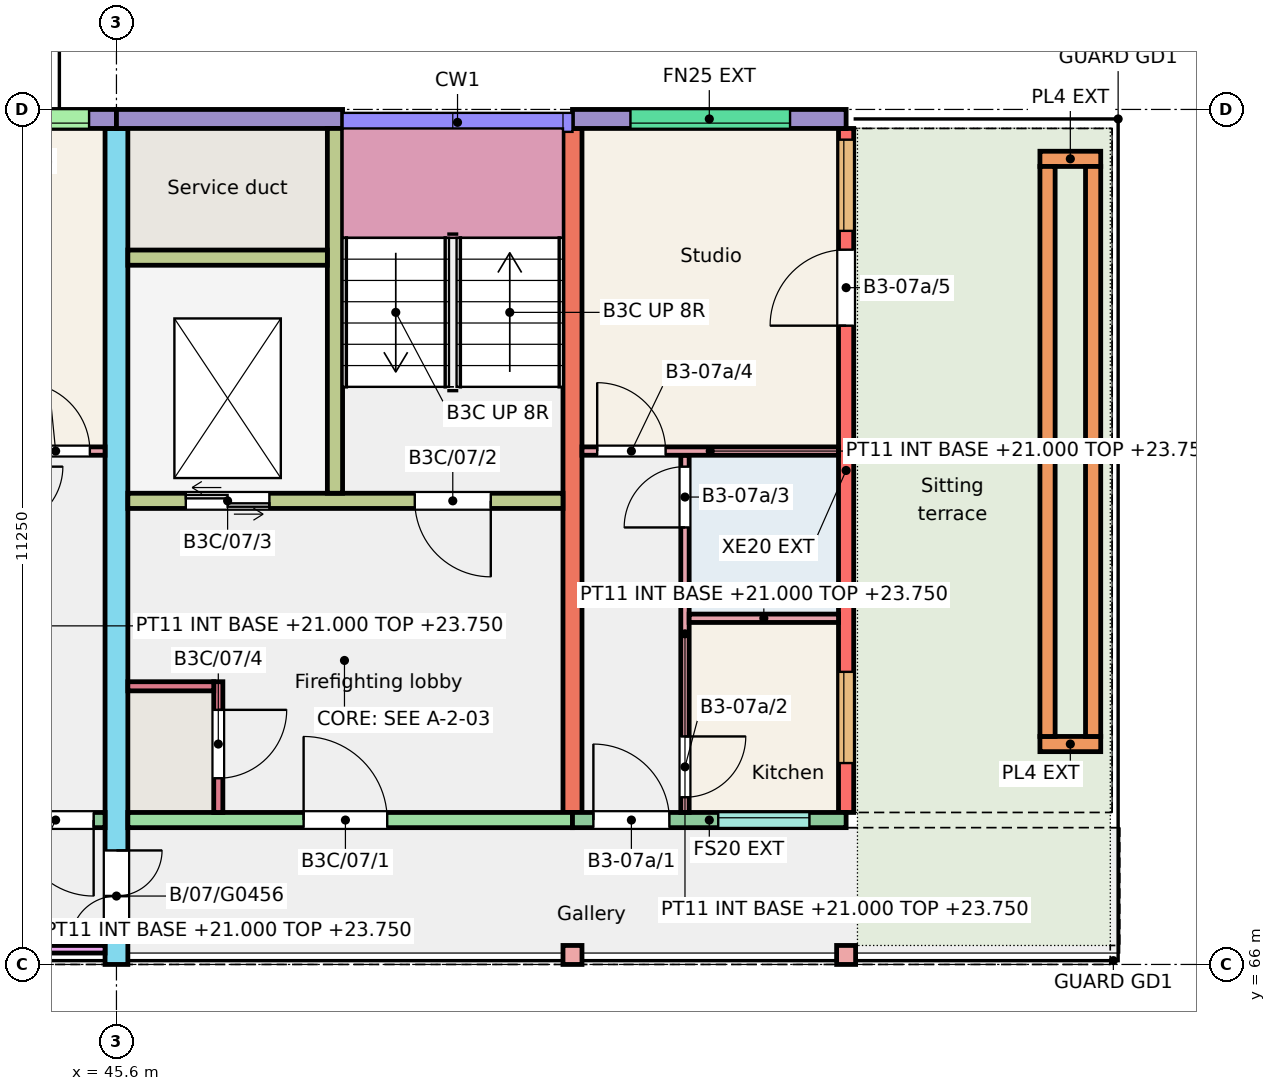
"""IFC4 building model, lengths in metres.
Left out: names, types, materials, properties, quantities, classifications, styles, units other than length and angle.
Written with IfcOpenShell. Run it as: python <this file> out.ifc"""

import sys

from ifc_helpers import new_model, si_unit, direction, frame, frame_2d, origin, origin_2d, place, context, subcontext, project, spatial, rectangle, extrude, element, fill, save


model = new_model("IFC4")
c1 = context("Model", 3, precision=1e-05, world=origin(), true_north=direction((0.0, 1.0)))
c2 = subcontext(c1, "Body", "Model", "MODEL_VIEW")
j1 = project(units=[si_unit("LENGTHUNIT", "METRE"), si_unit("PLANEANGLEUNIT", "RADIAN")], contexts=[c1])
p1 = place(None, origin())
s1 = spatial("IfcSite", under=j1, at=p1, CompositionType="ELEMENT")
p2 = place(p1, origin())
s2 = spatial("IfcBuilding", under=s1, at=p2, CompositionType="ELEMENT")
p3 = place(p2, frame((0.0, 0.0, 21.0)))
s3 = spatial("IfcBuildingStorey", under=s2, at=p3, CompositionType="ELEMENT", Elevation=21.0)
p4 = place(p3, frame((45.6, 66.0, 0.0), z_axis=(0.0, 0.0, 1.0), x_axis=(0.0, 1.0, 0.0)))
e1 = element("IfcWall", 1, at=p4, inside=s3, PredefinedType="SHEAR", context=c2, shape_type="SweptSolid", body=[
    extrude(rectangle(XDim=11.0, YDim=0.3, at=frame_2d((5.5, 0.0))), origin(), (0.0, 0.0, 1.0), 3.0),
])
p5 = place(p4, frame((0.3, 0.0, 0.0)))
e2 = element("IfcOpeningElement", 2, at=p5, cuts=e1, PredefinedType="OPENING", context=c2, shape_type="SweptSolid", body=[
    extrude(rectangle(XDim=1.2, YDim=2.1, at=frame_2d((0.6, 1.05))), frame((0.0, 0.16, 0.0), z_axis=(0.0, -1.0, 0.0), x_axis=(1.0, 0.0, 0.0)), (0.0, 0.0, 1.0), 0.32),
])
p6 = place(p3, frame((51.6, 68.0, 0.0), z_axis=(0.0, 0.0, 1.0), x_axis=(0.0, 1.0, 0.0)))
e3 = element("IfcWall", 3, at=p6, inside=s3, PredefinedType="SHEAR", context=c2, shape_type="SweptSolid", body=[
    extrude(rectangle(XDim=9.0, YDim=0.25, at=frame_2d((4.5, 0.0))), origin(), (0.0, 0.0, 1.0), 3.0),
])
p7 = place(p3, frame((55.2, 68.0, 0.0), z_axis=(0.0, 0.0, 1.0), x_axis=(0.0, 1.0, 0.0)))
e4 = element("IfcWall", 4, at=p7, inside=s3, PredefinedType="SHEAR", context=c2, shape_type="SweptSolid", body=[
    extrude(rectangle(XDim=9.0, YDim=0.2, at=frame_2d((4.5, 0.0))), origin(), (0.0, 0.0, 1.0), 3.0),
])
p8 = place(p7, frame((0.65, 0.0, 0.9)))
e5 = element("IfcOpeningElement", 5, at=p8, cuts=e4, PredefinedType="OPENING", context=c2, shape_type="SweptSolid", body=[
    extrude(rectangle(XDim=1.2, YDim=1.5, at=frame_2d((0.6, 0.75))), frame((0.0, 0.11, 0.0), z_axis=(0.0, -1.0, 0.0), x_axis=(1.0, 0.0, 0.0)), (0.0, 0.0, 1.0), 0.22),
])
p9 = place(p7, frame((7.653, 0.0, 0.9)))
e6 = element("IfcOpeningElement", 6, at=p9, cuts=e4, PredefinedType="OPENING", context=c2, shape_type="SweptSolid", body=[
    extrude(rectangle(XDim=1.2, YDim=1.5, at=frame_2d((0.6, 0.75))), frame((0.0, 0.11, 0.0), z_axis=(0.0, -1.0, 0.0), x_axis=(1.0, 0.0, 0.0)), (0.0, 0.0, 1.0), 0.22),
])
p10 = place(p7, frame((6.405, 0.0, 0.0)))
e7 = element("IfcOpeningElement", 7, at=p10, cuts=e4, PredefinedType="OPENING", context=c2, shape_type="SweptSolid", body=[
    extrude(rectangle(XDim=1.0, YDim=2.1, at=frame_2d((0.5, 1.05))), frame((0.0, 0.11, 0.0), z_axis=(0.0, -1.0, 0.0), x_axis=(1.0, 0.0, 0.0)), (0.0, 0.0, 1.0), 0.22),
])
p11 = place(p3, frame((42.0, 77.125, 0.0), z_axis=(0.0, 0.0, 1.0), x_axis=(1.0, 0.0, 0.0)))
e8 = element("IfcWall", 8, at=p11, inside=s3, PredefinedType="SOLIDWALL", context=c2, shape_type="SweptSolid", body=[
    extrude(rectangle(XDim=3.6, YDim=0.25, at=frame_2d((1.8, 0.0))), origin(), (0.0, 0.0, 1.0), 3.0),
])
p12 = place(p11, frame((1.74, 0.0, 1.2)))
e9 = element("IfcOpeningElement", 9, at=p12, cuts=e8, PredefinedType="OPENING", context=c2, shape_type="SweptSolid", body=[
    extrude(rectangle(XDim=1.5, YDim=1.2, at=frame_2d((0.75, 0.6))), frame((0.0, 0.135, 0.0), z_axis=(0.0, -1.0, 0.0), x_axis=(1.0, 0.0, 0.0)), (0.0, 0.0, 1.0), 0.27),
])
p13 = place(p11, frame((0.43, 0.0, 0.0)))
e10 = element("IfcOpeningElement", 10, at=p13, cuts=e8, PredefinedType="OPENING", context=c2, shape_type="SweptSolid", body=[
    extrude(rectangle(XDim=1.0, YDim=2.1, at=frame_2d((0.5, 1.05))), frame((0.0, 0.135, 0.0), z_axis=(0.0, -1.0, 0.0), x_axis=(1.0, 0.0, 0.0)), (0.0, 0.0, 1.0), 0.27),
])
p14 = place(p3, frame((42.0, 67.9, 0.0), z_axis=(0.0, 0.0, 1.0), x_axis=(1.0, 0.0, 0.0)))
e11 = element("IfcWall", 11, at=p14, inside=s3, PredefinedType="SOLIDWALL", context=c2, shape_type="SweptSolid", body=[
    extrude(rectangle(XDim=3.45, YDim=0.2, at=frame_2d((1.725, 0.0))), origin(), (0.0, 0.0, 1.0), 3.0),
])
p15 = place(p14, frame((0.47, 0.0, 1.1)))
e12 = element("IfcOpeningElement", 12, at=p15, cuts=e11, PredefinedType="OPENING", context=c2, shape_type="SweptSolid", body=[
    extrude(rectangle(XDim=1.2, YDim=1.3, at=frame_2d((0.6, 0.65))), frame((0.0, 0.11, 0.0), z_axis=(0.0, -1.0, 0.0), x_axis=(1.0, 0.0, 0.0)), (0.0, 0.0, 1.0), 0.22),
])
p16 = place(p14, frame((2.3, 0.0, 0.0)))
e13 = element("IfcOpeningElement", 13, at=p16, cuts=e11, PredefinedType="OPENING", context=c2, shape_type="SweptSolid", body=[
    extrude(rectangle(XDim=1.0, YDim=2.1, at=frame_2d((0.5, 1.05))), frame((0.0, 0.11, 0.0), z_axis=(0.0, -1.0, 0.0), x_axis=(1.0, 0.0, 0.0)), (0.0, 0.0, 1.0), 0.22),
])
p17 = place(p3, frame((45.6, 77.125, 0.0), z_axis=(0.0, 0.0, 1.0), x_axis=(1.0, 0.0, 0.0)))
e14 = element("IfcWall", 14, at=p17, inside=s3, PredefinedType="SOLIDWALL", context=c2, shape_type="SweptSolid", body=[
    extrude(rectangle(XDim=2.975, YDim=0.25, at=frame_2d((1.487, 0.0))), origin(), (0.0, 0.0, 1.0), 3.0),
])
p18 = place(p3, frame((45.75, 67.9, 0.0), z_axis=(0.0, 0.0, 1.0), x_axis=(1.0, 0.0, 0.0)))
e15 = element("IfcWall", 15, at=p18, inside=s3, PredefinedType="SHEAR", context=c2, shape_type="SweptSolid", body=[
    extrude(rectangle(XDim=5.85, YDim=0.2, at=frame_2d((2.925, 0.0))), origin(), (0.0, 0.0, 1.0), 3.0),
])
p19 = place(p18, frame((2.312, 0.0, 0.0)))
e16 = element("IfcOpeningElement", 16, at=p19, cuts=e15, PredefinedType="OPENING", context=c2, shape_type="SweptSolid", body=[
    extrude(rectangle(XDim=1.1, YDim=2.1, at=frame_2d((0.55, 1.05))), frame((0.0, 0.11, 0.0), z_axis=(0.0, -1.0, 0.0), x_axis=(1.0, 0.0, 0.0)), (0.0, 0.0, 1.0), 0.22),
])
p20 = place(p3, frame((45.75, 72.1, 0.0), z_axis=(0.0, 0.0, 1.0), x_axis=(1.0, 0.0, 0.0)))
e17 = element("IfcWall", 17, at=p20, inside=s3, PredefinedType="SHEAR", context=c2, shape_type="SweptSolid", body=[
    extrude(rectangle(XDim=5.725, YDim=0.2, at=frame_2d((2.863, 0.0))), origin(), (0.0, 0.0, 1.0), 3.0),
])
p21 = place(p20, frame((3.775, 0.0, 0.0)))
e18 = element("IfcOpeningElement", 18, at=p21, cuts=e17, PredefinedType="OPENING", context=c2, shape_type="SweptSolid", body=[
    extrude(rectangle(XDim=1.0, YDim=2.1, at=frame_2d((0.5, 1.05))), frame((0.0, 0.11, 0.0), z_axis=(0.0, -1.0, 0.0), x_axis=(1.0, 0.0, 0.0)), (0.0, 0.0, 1.0), 0.22),
])
p22 = place(p20, frame((0.762, 0.0, 0.0)))
e19 = element("IfcOpeningElement", 19, at=p22, cuts=e17, PredefinedType="OPENING", context=c2, shape_type="SweptSolid", body=[
    extrude(rectangle(XDim=1.1, YDim=2.1, at=frame_2d((0.55, 1.05))), frame((0.0, 0.11, 0.0), z_axis=(0.0, -1.0, 0.0), x_axis=(1.0, 0.0, 0.0)), (0.0, 0.0, 1.0), 0.22),
])
p23 = place(p3, frame((48.475, 72.2, 0.0), z_axis=(0.0, 0.0, 1.0), x_axis=(0.0, 1.0, 0.0)))
e20 = element("IfcWall", 20, at=p23, inside=s3, PredefinedType="SHEAR", context=c2, shape_type="SweptSolid", body=[
    extrude(rectangle(XDim=4.8, YDim=0.2, at=frame_2d((2.4, 0.0))), origin(), (0.0, 0.0, 1.0), 3.0),
])
p24 = place(p3, frame((45.75, 75.3, 0.0), z_axis=(0.0, 0.0, 1.0), x_axis=(1.0, 0.0, 0.0)))
e21 = element("IfcWall", 21, at=p24, inside=s3, PredefinedType="SHEAR", context=c2, shape_type="SweptSolid", body=[
    extrude(rectangle(XDim=2.625, YDim=0.2, at=frame_2d((1.312, 0.0))), origin(), (0.0, 0.0, 1.0), 3.0),
])
p25 = place(p3, frame((46.94, 68.0, 0.0), z_axis=(0.0, 0.0, 1.0), x_axis=(0.0, 1.0, 0.0)))
e22 = element("IfcWall", 22, at=p25, inside=s3, PredefinedType="SHEAR", context=c2, shape_type="SweptSolid", body=[
    extrude(rectangle(XDim=1.72, YDim=0.12, at=frame_2d((0.86, 0.0))), origin(), (0.0, 0.0, 1.0), 3.0),
])
p26 = place(p25, frame((0.45, 0.0, 0.0)))
e23 = element("IfcOpeningElement", 23, at=p26, cuts=e22, PredefinedType="OPENING", context=c2, shape_type="SweptSolid", body=[
    extrude(rectangle(XDim=0.9, YDim=2.1, at=frame_2d((0.45, 1.05))), frame((0.0, 0.07, 0.0), z_axis=(0.0, -1.0, 0.0), x_axis=(1.0, 0.0, 0.0)), (0.0, 0.0, 1.0), 0.14),
])
p27 = place(p3, frame((45.75, 69.66, 0.0), z_axis=(0.0, 0.0, 1.0), x_axis=(1.0, 0.0, 0.0)))
e24 = element("IfcWall", 24, at=p27, inside=s3, PredefinedType="SHEAR", context=c2, shape_type="SweptSolid", body=[
    extrude(rectangle(XDim=1.13, YDim=0.12, at=frame_2d((0.565, 0.0))), origin(), (0.0, 0.0, 1.0), 3.0),
])
p28 = place(p3, frame((51.6, 77.125, 0.0), z_axis=(0.0, 0.0, 1.0), x_axis=(1.0, 0.0, 0.0)))
e25 = element("IfcWall", 25, at=p28, inside=s3, PredefinedType="SOLIDWALL", context=c2, shape_type="SweptSolid", body=[
    extrude(rectangle(XDim=3.6, YDim=0.25, at=frame_2d((1.8, 0.0))), origin(), (0.0, 0.0, 1.0), 3.0),
])
p29 = place(p28, frame((0.762, 0.0, 1.2)))
e26 = element("IfcOpeningElement", 26, at=p29, cuts=e25, PredefinedType="OPENING", context=c2, shape_type="SweptSolid", body=[
    extrude(rectangle(XDim=2.1, YDim=1.2, at=frame_2d((1.05, 0.6))), frame((0.0, 0.135, 0.0), z_axis=(0.0, -1.0, 0.0), x_axis=(1.0, 0.0, 0.0)), (0.0, 0.0, 1.0), 0.27),
])
p30 = place(p3, frame((51.6, 67.9, 0.0), z_axis=(0.0, 0.0, 1.0), x_axis=(1.0, 0.0, 0.0)))
e27 = element("IfcWall", 27, at=p30, inside=s3, PredefinedType="SOLIDWALL", context=c2, shape_type="SweptSolid", body=[
    extrude(rectangle(XDim=3.6, YDim=0.2, at=frame_2d((1.8, 0.0))), origin(), (0.0, 0.0, 1.0), 3.0),
])
p31 = place(p30, frame((1.917, 0.0, 1.1)))
e28 = element("IfcOpeningElement", 28, at=p31, cuts=e27, PredefinedType="OPENING", context=c2, shape_type="SweptSolid", body=[
    extrude(rectangle(XDim=1.2, YDim=1.3, at=frame_2d((0.6, 0.65))), frame((0.0, 0.11, 0.0), z_axis=(0.0, -1.0, 0.0), x_axis=(1.0, 0.0, 0.0)), (0.0, 0.0, 1.0), 0.22),
])
p32 = place(p30, frame((0.275, 0.0, 0.0)))
e29 = element("IfcOpeningElement", 29, at=p32, cuts=e27, PredefinedType="OPENING", context=c2, shape_type="SweptSolid", body=[
    extrude(rectangle(XDim=1.0, YDim=2.1, at=frame_2d((0.5, 1.05))), frame((0.0, 0.11, 0.0), z_axis=(0.0, -1.0, 0.0), x_axis=(1.0, 0.0, 0.0)), (0.0, 0.0, 1.0), 0.22),
])
for number, where, z_axis, x_axis in (
    (30, (51.6, 66.125, 0.0), (0.0, 0.0, 1.0), (1.0, 0.0, 0.0)),
    (31, (55.2, 66.125, 0.0), (0.0, 0.0, 1.0), (1.0, 0.0, 0.0)),
):
    element("IfcColumn", number, at=place(p3, frame(where, z_axis=z_axis, x_axis=x_axis)), inside=s3, PredefinedType="COLUMN", context=c2, shape_type="SweptSolid", body=[
        extrude(rectangle(XDim=0.25, YDim=0.25, at=origin_2d()), origin(), (0.0, 0.0, 1.0), 3.0),
    ])
for number, where, z_axis, x_axis in (
    (32, (57.75, 68.9, 0.01), (0.0, 0.0, 1.0), (1.0, 0.0, 0.0)),
    (33, (57.75, 76.6, 0.01), (0.0, 0.0, 1.0), (1.0, 0.0, 0.0)),
):
    element("IfcWall", number, at=place(p3, frame(where, z_axis=z_axis, x_axis=x_axis)), inside=s3, PredefinedType="SOLIDWALL", context=c2, shape_type="SweptSolid", body=[
        extrude(rectangle(XDim=0.8, YDim=0.2, at=frame_2d((0.4, 0.0))), origin(), (0.0, 0.0, 1.0), 0.45),
    ])
for number, where, z_axis, x_axis in (
    (34, (57.85, 69.0, 0.01), (0.0, 0.0, 1.0), (0.0, 1.0, 0.0)),
    (35, (58.45, 69.0, 0.01), (0.0, 0.0, 1.0), (0.0, 1.0, 0.0)),
):
    element("IfcWall", number, at=place(p3, frame(where, z_axis=z_axis, x_axis=x_axis)), inside=s3, PredefinedType="SOLIDWALL", context=c2, shape_type="SweptSolid", body=[
        extrude(rectangle(XDim=7.5, YDim=0.2, at=frame_2d((3.75, 0.0))), origin(), (0.0, 0.0, 1.0), 0.45),
    ])
p33 = place(p3, frame((42.125, 66.2, 0.0), z_axis=(0.0, 0.0, 1.0), x_axis=(1.0, 0.0, 0.0)))
e36 = element("IfcWall", 36, at=p33, inside=s3, PredefinedType="SOLIDWALL", context=c2, shape_type="SweptSolid", body=[
    extrude(rectangle(XDim=3.325, YDim=0.1, at=frame_2d((1.663, 0.0))), origin(), (0.0, 0.0, 1.0), 2.45),
])
p34 = place(p3, frame((42.1, 72.755, 0.0), z_axis=(0.0, 0.0, 1.0), x_axis=(1.0, 0.0, 0.0)))
e37 = element("IfcWall", 37, at=p34, inside=s3, PredefinedType="PARTITIONING", context=c2, shape_type="SweptSolid", body=[
    extrude(rectangle(XDim=3.35, YDim=0.11, at=frame_2d((1.675, 0.0))), origin(), (0.0, 0.0, 1.0), 2.75),
])
p35 = place(p34, frame((2.25, 0.0, 0.0)))
e38 = element("IfcOpeningElement", 38, at=p35, cuts=e37, PredefinedType="OPENING", context=c2, shape_type="SweptSolid", body=[
    extrude(rectangle(XDim=0.9, YDim=2.1, at=frame_2d((0.45, 1.05))), frame((0.0, 0.065, 0.0), z_axis=(0.0, -1.0, 0.0), x_axis=(1.0, 0.0, 0.0)), (0.0, 0.0, 1.0), 0.13),
])
p36 = place(p3, frame((53.08, 68.0, 0.0), z_axis=(0.0, 0.0, 1.0), x_axis=(0.0, 1.0, 0.0)))
e39 = element("IfcWall", 39, at=p36, inside=s3, PredefinedType="PARTITIONING", context=c2, shape_type="SweptSolid", body=[
    extrude(rectangle(XDim=4.7, YDim=0.11, at=frame_2d((2.35, 0.0))), origin(), (0.0, 0.0, 1.0), 2.75),
])
p37 = place(p36, frame((0.2, 0.0, 0.0)))
e40 = element("IfcOpeningElement", 40, at=p37, cuts=e39, PredefinedType="OPENING", context=c2, shape_type="SweptSolid", body=[
    extrude(rectangle(XDim=0.8, YDim=2.1, at=frame_2d((0.4, 1.05))), frame((0.0, 0.065, 0.0), z_axis=(0.0, -1.0, 0.0), x_axis=(1.0, 0.0, 0.0)), (0.0, 0.0, 1.0), 0.13),
])
p38 = place(p36, frame((3.75, 0.0, 0.0)))
e41 = element("IfcOpeningElement", 41, at=p38, cuts=e39, PredefinedType="OPENING", context=c2, shape_type="SweptSolid", body=[
    extrude(rectangle(XDim=0.8, YDim=2.1, at=frame_2d((0.4, 1.05))), frame((0.0, 0.065, 0.0), z_axis=(0.0, -1.0, 0.0), x_axis=(1.0, 0.0, 0.0)), (0.0, 0.0, 1.0), 0.13),
])
p39 = place(p3, frame((53.135, 70.555, 0.0), z_axis=(0.0, 0.0, 1.0), x_axis=(1.0, 0.0, 0.0)))
e42 = element("IfcWall", 42, at=p39, inside=s3, PredefinedType="PARTITIONING", context=c2, shape_type="SweptSolid", body=[
    extrude(rectangle(XDim=1.965, YDim=0.11, at=frame_2d((0.982, 0.0))), origin(), (0.0, 0.0, 1.0), 2.75),
])
p40 = place(p3, frame((51.725, 72.755, 0.0), z_axis=(0.0, 0.0, 1.0), x_axis=(1.0, 0.0, 0.0)))
e43 = element("IfcWall", 43, at=p40, inside=s3, PredefinedType="PARTITIONING", context=c2, shape_type="SweptSolid", body=[
    extrude(rectangle(XDim=3.375, YDim=0.11, at=frame_2d((1.688, 0.0))), origin(), (0.0, 0.0, 1.0), 2.75),
])
p41 = place(p40, frame((0.2, 0.0, 0.0)))
e44 = element("IfcOpeningElement", 44, at=p41, cuts=e43, PredefinedType="OPENING", context=c2, shape_type="SweptSolid", body=[
    extrude(rectangle(XDim=0.9, YDim=2.1, at=frame_2d((0.45, 1.05))), frame((0.0, 0.065, 0.0), z_axis=(0.0, -1.0, 0.0), x_axis=(1.0, 0.0, 0.0)), (0.0, 0.0, 1.0), 0.13),
])
p42 = place(p12, origin())
e45 = element("IfcWindow", 45, at=p42, inside=s3, PartitioningType="SINGLE_PANEL", PredefinedType="WINDOW", context=c2, shape_type="SweptSolid", body=[
    extrude(rectangle(XDim=1.5, YDim=1.2, at=frame_2d((0.75, 0.6))), frame((0.0, -0.025, 0.0), z_axis=(0.0, -1.0, 0.0), x_axis=(1.0, 0.0, 0.0)), (0.0, 0.0, 1.0), 0.06),
])
fill(e9, e45)
p43 = place(p31, origin())
e46 = element("IfcWindow", 46, at=p43, inside=s3, PartitioningType="SINGLE_PANEL", PredefinedType="WINDOW", context=c2, shape_type="SweptSolid", body=[
    extrude(rectangle(XDim=1.2, YDim=1.3, at=frame_2d((0.6, 0.65))), frame((0.0, 0.06, 0.0), z_axis=(0.0, -1.0, 0.0), x_axis=(1.0, 0.0, 0.0)), (0.0, 0.0, 1.0), 0.06),
])
fill(e28, e46)
p44 = place(p29, origin())
e47 = element("IfcWindow", 47, at=p44, inside=s3, PartitioningType="SINGLE_PANEL", PredefinedType="WINDOW", context=c2, shape_type="SweptSolid", body=[
    extrude(rectangle(XDim=2.1, YDim=1.2, at=frame_2d((1.05, 0.6))), frame((0.0, -0.025, 0.0), z_axis=(0.0, -1.0, 0.0), x_axis=(1.0, 0.0, 0.0)), (0.0, 0.0, 1.0), 0.06),
])
fill(e26, e47)
p45 = place(p8, origin())
e48 = element("IfcWindow", 48, at=p45, inside=s3, PartitioningType="SINGLE_PANEL", PredefinedType="WINDOW", context=c2, shape_type="SweptSolid", body=[
    extrude(rectangle(XDim=1.2, YDim=1.5, at=frame_2d((0.6, 0.75))), frame((0.0, 0.06, 0.0), z_axis=(0.0, -1.0, 0.0), x_axis=(1.0, 0.0, 0.0)), (0.0, 0.0, 1.0), 0.06),
])
fill(e5, e48)
p46 = place(p9, origin())
e49 = element("IfcWindow", 49, at=p46, inside=s3, PartitioningType="SINGLE_PANEL", PredefinedType="WINDOW", context=c2, shape_type="SweptSolid", body=[
    extrude(rectangle(XDim=1.2, YDim=1.5, at=frame_2d((0.6, 0.75))), frame((0.0, 0.06, 0.0), z_axis=(0.0, -1.0, 0.0), x_axis=(1.0, 0.0, 0.0)), (0.0, 0.0, 1.0), 0.06),
])
fill(e6, e49)
p47 = place(p16, origin())
e50 = element("IfcDoor", 50, at=p47, inside=s3, OperationType="SINGLE_SWING_RIGHT", PredefinedType="DOOR", context=c2, shape_type="SweptSolid", body=[
    extrude(rectangle(XDim=1.0, YDim=2.1, at=frame_2d((0.5, 1.05))), frame((0.0, 0.025, 0.0), z_axis=(0.0, -1.0, 0.0), x_axis=(1.0, 0.0, 0.0)), (0.0, 0.0, 1.0), 0.05),
])
fill(e13, e50)
p48 = place(p35, origin())
e51 = element("IfcDoor", 51, at=p48, inside=s3, OperationType="SINGLE_SWING_LEFT", PredefinedType="DOOR", context=c2, shape_type="SweptSolid", body=[
    extrude(rectangle(XDim=0.9, YDim=2.1, at=frame_2d((0.45, 1.05))), frame((0.0, 0.025, 0.0), z_axis=(0.0, -1.0, 0.0), x_axis=(1.0, 0.0, 0.0)), (0.0, 0.0, 1.0), 0.05),
])
fill(e38, e51)
p49 = place(p32, origin())
e52 = element("IfcDoor", 52, at=p49, inside=s3, OperationType="SINGLE_SWING_LEFT", PredefinedType="DOOR", context=c2, shape_type="SweptSolid", body=[
    extrude(rectangle(XDim=1.0, YDim=2.1, at=frame_2d((0.5, 1.05))), frame((0.0, 0.025, 0.0), z_axis=(0.0, -1.0, 0.0), x_axis=(1.0, 0.0, 0.0)), (0.0, 0.0, 1.0), 0.05),
])
fill(e29, e52)
p50 = place(p37, origin())
e53 = element("IfcDoor", 53, at=p50, inside=s3, OperationType="SINGLE_SWING_RIGHT", PredefinedType="DOOR", context=c2, shape_type="SweptSolid", body=[
    extrude(rectangle(XDim=0.8, YDim=2.1, at=frame_2d((0.4, 1.05))), frame((0.0, 0.025, 0.0), z_axis=(0.0, -1.0, 0.0), x_axis=(1.0, 0.0, 0.0)), (0.0, 0.0, 1.0), 0.05),
])
fill(e40, e53)
p51 = place(p38, origin())
e54 = element("IfcDoor", 54, at=p51, inside=s3, OperationType="SINGLE_SWING_LEFT", PredefinedType="DOOR", context=c2, shape_type="SweptSolid", body=[
    extrude(rectangle(XDim=0.8, YDim=2.1, at=frame_2d((0.4, 1.05))), frame((0.0, 0.025, 0.0), z_axis=(0.0, -1.0, 0.0), x_axis=(1.0, 0.0, 0.0)), (0.0, 0.0, 1.0), 0.05),
])
fill(e41, e54)
p52 = place(p41, origin())
e55 = element("IfcDoor", 55, at=p52, inside=s3, OperationType="SINGLE_SWING_LEFT", PredefinedType="DOOR", context=c2, shape_type="SweptSolid", body=[
    extrude(rectangle(XDim=0.9, YDim=2.1, at=frame_2d((0.45, 1.05))), frame((0.0, 0.025, 0.0), z_axis=(0.0, -1.0, 0.0), x_axis=(1.0, 0.0, 0.0)), (0.0, 0.0, 1.0), 0.05),
])
fill(e44, e55)
p53 = place(p10, origin())
e56 = element("IfcDoor", 56, at=p53, inside=s3, OperationType="SINGLE_SWING_LEFT", PredefinedType="DOOR", context=c2, shape_type="SweptSolid", body=[
    extrude(rectangle(XDim=1.0, YDim=2.1, at=frame_2d((0.5, 1.05))), frame((0.0, 0.025, 0.0), z_axis=(0.0, -1.0, 0.0), x_axis=(1.0, 0.0, 0.0)), (0.0, 0.0, 1.0), 0.05),
])
fill(e7, e56)
p54 = place(p19, origin())
e57 = element("IfcDoor", 57, at=p54, inside=s3, OperationType="SINGLE_SWING_LEFT", PredefinedType="DOOR", context=c2, shape_type="SweptSolid", body=[
    extrude(rectangle(XDim=1.1, YDim=2.1, at=frame_2d((0.55, 1.05))), frame((0.0, 0.025, 0.0), z_axis=(0.0, -1.0, 0.0), x_axis=(1.0, 0.0, 0.0)), (0.0, 0.0, 1.0), 0.05),
])
fill(e16, e57)
p55 = place(p21, origin())
e58 = element("IfcDoor", 58, at=p55, inside=s3, OperationType="SINGLE_SWING_RIGHT", PredefinedType="DOOR", context=c2, shape_type="SweptSolid", body=[
    extrude(rectangle(XDim=1.0, YDim=2.1, at=frame_2d((0.5, 1.05))), frame((0.0, 0.025, 0.0), z_axis=(0.0, -1.0, 0.0), x_axis=(1.0, 0.0, 0.0)), (0.0, 0.0, 1.0), 0.05),
])
fill(e18, e58)
p56 = place(p22, origin())
e59 = element("IfcDoor", 59, at=p56, inside=s3, OperationType="DOUBLE_DOOR_SLIDING", PredefinedType="DOOR", context=c2, shape_type="SweptSolid", body=[
    extrude(rectangle(XDim=1.1, YDim=2.1, at=frame_2d((0.55, 1.05))), frame((0.0, 0.025, 0.0), z_axis=(0.0, -1.0, 0.0), x_axis=(1.0, 0.0, 0.0)), (0.0, 0.0, 1.0), 0.05),
])
fill(e19, e59)
p57 = place(p26, origin())
e60 = element("IfcDoor", 60, at=p57, inside=s3, OperationType="SINGLE_SWING_RIGHT", PredefinedType="DOOR", context=c2, shape_type="SweptSolid", body=[
    extrude(rectangle(XDim=0.9, YDim=2.1, at=frame_2d((0.45, 1.05))), frame((0.0, 0.025, 0.0), z_axis=(0.0, -1.0, 0.0), x_axis=(1.0, 0.0, 0.0)), (0.0, 0.0, 1.0), 0.05),
])
fill(e23, e60)
p58 = place(p5, origin())
e61 = element("IfcDoor", 61, at=p58, inside=s3, OperationType="DOUBLE_DOOR_SINGLE_SWING", PredefinedType="DOOR", context=c2, shape_type="SweptSolid", body=[
    extrude(rectangle(XDim=1.2, YDim=2.1, at=frame_2d((0.6, 1.05))), frame((0.0, 0.025, 0.0), z_axis=(0.0, -1.0, 0.0), x_axis=(1.0, 0.0, 0.0)), (0.0, 0.0, 1.0), 0.05),
])
fill(e2, e61)
save(model, sys.argv[1])
